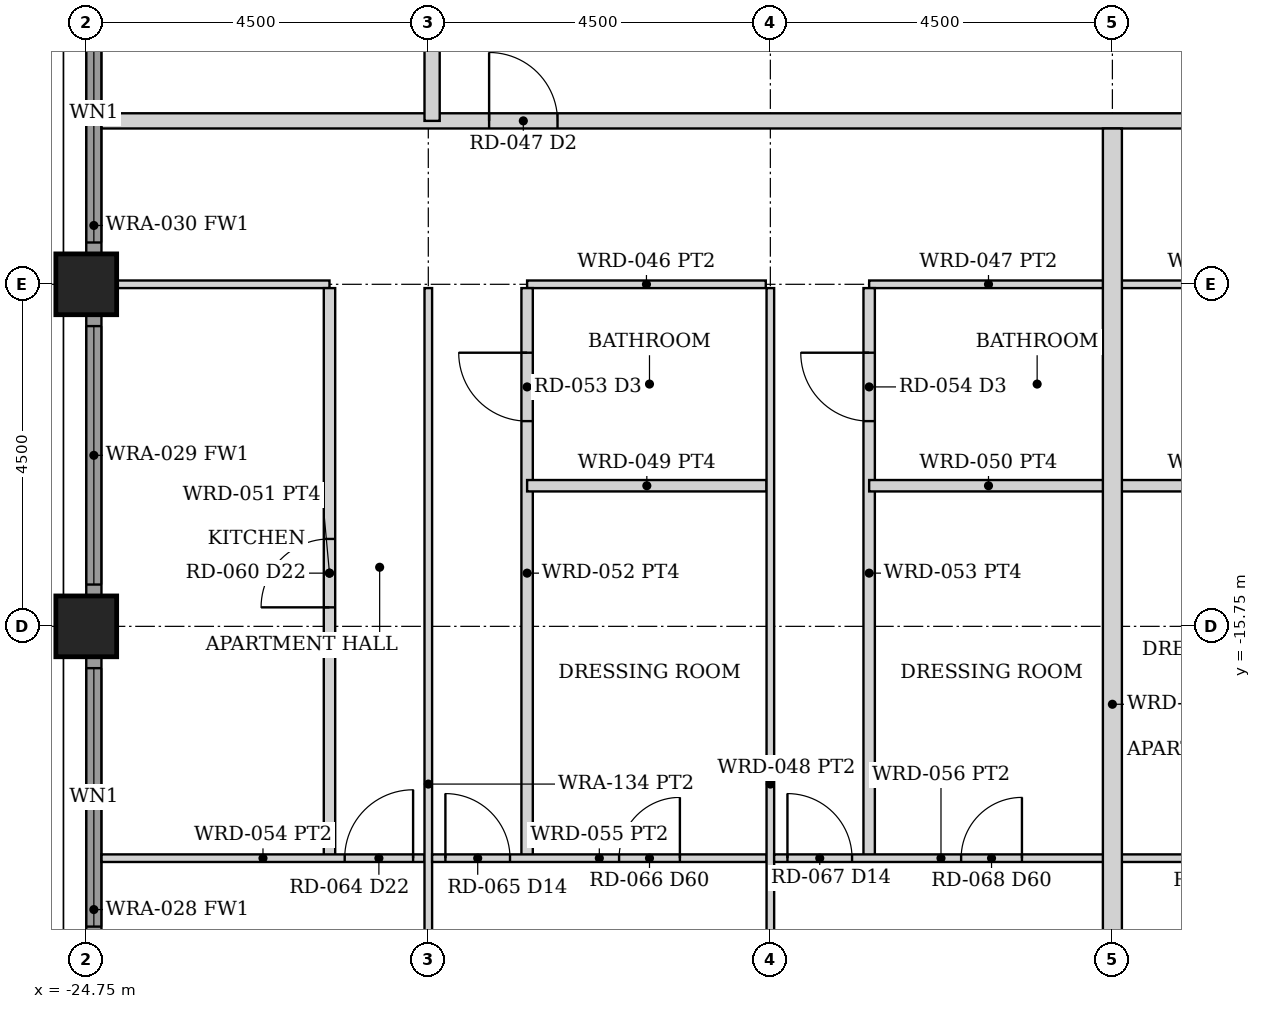
"""IFC4 building model, lengths in metres.
Left out: names, types, materials, properties, quantities, classifications, styles, units other than length and angle.
Written with IfcOpenShell. Run it as: python <this file> out.ifc"""

import sys

from ifc_helpers import new_model, si_unit, direction, frame, frame_2d, origin, origin_2d, place, context, subcontext, project, spatial, rectangle, hollow_rectangle, extrude, element, fill, save


model = new_model("IFC4")
c1 = context("Model", 3, precision=1e-05, world=origin(), true_north=direction((0.0, 1.0)))
c2 = subcontext(c1, "Body", "Model", "MODEL_VIEW")
j1 = project(units=[si_unit("LENGTHUNIT", "METRE"), si_unit("PLANEANGLEUNIT", "RADIAN")], contexts=[c1])
p1 = place(None, origin())
s1 = spatial("IfcSite", under=j1, at=p1, CompositionType="ELEMENT")
p2 = place(p1, origin())
s2 = spatial("IfcBuilding", under=s1, at=p2, CompositionType="ELEMENT")
p3 = place(p2, frame((0.0, 0.0, 58.0)))
s3 = spatial("IfcBuildingStorey", under=s2, at=p3, CompositionType="ELEMENT", Elevation=58.0)
for number, where, z_axis, x_axis in (
    (1, (-24.75, -15.75, 0.0), (0.0, 0.0, 1.0), (1.0, 0.0, 0.0)),
    (2, (-24.75, -11.25, 0.0), (0.0, 0.0, 1.0), (1.0, 0.0, 0.0)),
):
    element("IfcColumn", number, at=place(p3, frame(where, z_axis=z_axis, x_axis=x_axis)), inside=s3, PredefinedType="COLUMN", context=c2, shape_type="SweptSolid", body=[
        extrude(hollow_rectangle(XDim=0.8, YDim=0.8, WallThickness=0.06, at=origin_2d()), origin(), (0.0, 0.0, 1.0), 3.5),
    ])
p4 = place(p3, frame((-24.65, -19.845, 0.0), z_axis=(0.0, 0.0, 1.0), x_axis=(0.0, 1.0, 0.0)))
e3 = element("IfcWall", 3, at=p4, inside=s3, PredefinedType="SOLIDWALL", context=c2, shape_type="SweptSolid", body=[
    extrude(rectangle(XDim=3.69, YDim=0.2, at=frame_2d((1.845, 0.0))), origin(), (0.0, 0.0, 1.0), 2.379),
])
p5 = place(p4, frame((0.145, 0.0, 0.3)))
e4 = element("IfcOpeningElement", 4, at=p5, cuts=e3, PredefinedType="OPENING", context=c2, shape_type="SweptSolid", body=[
    extrude(rectangle(XDim=3.4, YDim=1.929, at=frame_2d((1.7, 0.964))), frame((0.0, 0.11, 0.0), z_axis=(0.0, -1.0, 0.0), x_axis=(1.0, 0.0, 0.0)), (0.0, 0.0, 1.0), 0.22),
])
p6 = place(p3, frame((-24.65, -15.345, 0.0), z_axis=(0.0, 0.0, 1.0), x_axis=(0.0, 1.0, 0.0)))
e5 = element("IfcWall", 5, at=p6, inside=s3, PredefinedType="SOLIDWALL", context=c2, shape_type="SweptSolid", body=[
    extrude(rectangle(XDim=3.69, YDim=0.2, at=frame_2d((1.845, 0.0))), origin(), (0.0, 0.0, 1.0), 2.379),
])
p7 = place(p6, frame((0.145, 0.0, 0.3)))
e6 = element("IfcOpeningElement", 6, at=p7, cuts=e5, PredefinedType="OPENING", context=c2, shape_type="SweptSolid", body=[
    extrude(rectangle(XDim=3.4, YDim=1.929, at=frame_2d((1.7, 0.964))), frame((0.0, 0.11, 0.0), z_axis=(0.0, -1.0, 0.0), x_axis=(1.0, 0.0, 0.0)), (0.0, 0.0, 1.0), 0.22),
])
p8 = place(p3, frame((-24.65, -10.845, 0.0), z_axis=(0.0, 0.0, 1.0), x_axis=(0.0, 1.0, 0.0)))
e7 = element("IfcWall", 7, at=p8, inside=s3, PredefinedType="SOLIDWALL", context=c2, shape_type="SweptSolid", body=[
    extrude(rectangle(XDim=3.69, YDim=0.2, at=frame_2d((1.845, 0.0))), origin(), (0.0, 0.0, 1.0), 2.379),
])
p9 = place(p8, frame((0.145, 0.0, 0.3)))
e8 = element("IfcOpeningElement", 8, at=p9, cuts=e7, PredefinedType="OPENING", context=c2, shape_type="SweptSolid", body=[
    extrude(rectangle(XDim=3.4, YDim=1.929, at=frame_2d((1.7, 0.964))), frame((0.0, 0.11, 0.0), z_axis=(0.0, -1.0, 0.0), x_axis=(1.0, 0.0, 0.0)), (0.0, 0.0, 1.0), 0.22),
])
p10 = place(p3, frame((-24.55, -9.1, 0.0), z_axis=(0.0, 0.0, 1.0), x_axis=(1.0, 0.0, 0.0)))
e9 = element("IfcWall", 9, at=p10, inside=s3, PredefinedType="PARTITIONING", context=c2, shape_type="SweptSolid", body=[
    extrude(rectangle(XDim=49.1, YDim=0.2, at=frame_2d((24.55, 0.0))), origin(), (0.0, 0.0, 1.0), 2.373),
])
p11 = place(p10, frame((5.1, 0.0, 0.0)))
e10 = element("IfcOpeningElement", 10, at=p11, cuts=e9, PredefinedType="OPENING", context=c2, shape_type="SweptSolid", body=[
    extrude(rectangle(XDim=0.9, YDim=2.1, at=frame_2d((0.45, 1.05))), frame((0.0, 0.11, 0.0), z_axis=(0.0, -1.0, 0.0), x_axis=(1.0, 0.0, 0.0)), (0.0, 0.0, 1.0), 0.22),
])
p12 = place(p10, frame((18.1, 0.0, 0.0)))
e11 = element("IfcOpeningElement", 11, at=p12, cuts=e9, PredefinedType="OPENING", context=c2, shape_type="SweptSolid", body=[
    extrude(rectangle(XDim=0.9, YDim=2.1, at=frame_2d((0.45, 1.05))), frame((0.0, 0.11, 0.0), z_axis=(0.0, -1.0, 0.0), x_axis=(1.0, 0.0, 0.0)), (0.0, 0.0, 1.0), 0.22),
])
p13 = place(p10, frame((22.5, 0.0, 0.0)))
e12 = element("IfcOpeningElement", 12, at=p13, cuts=e9, PredefinedType="OPENING", context=c2, shape_type="SweptSolid", body=[
    extrude(rectangle(XDim=0.9, YDim=2.1, at=frame_2d((0.45, 1.05))), frame((0.0, 0.11, 0.0), z_axis=(0.0, -1.0, 0.0), x_axis=(1.0, 0.0, 0.0)), (0.0, 0.0, 1.0), 0.22),
])
p14 = place(p10, frame((27.1, 0.0, 0.0)))
e13 = element("IfcOpeningElement", 13, at=p14, cuts=e9, PredefinedType="OPENING", context=c2, shape_type="SweptSolid", body=[
    extrude(rectangle(XDim=0.9, YDim=2.1, at=frame_2d((0.45, 1.05))), frame((0.0, 0.11, 0.0), z_axis=(0.0, -1.0, 0.0), x_axis=(1.0, 0.0, 0.0)), (0.0, 0.0, 1.0), 0.22),
])
p15 = place(p10, frame((43.1, 0.0, 0.0)))
e14 = element("IfcOpeningElement", 14, at=p15, cuts=e9, PredefinedType="OPENING", context=c2, shape_type="SweptSolid", body=[
    extrude(rectangle(XDim=0.9, YDim=2.1, at=frame_2d((0.45, 1.05))), frame((0.0, 0.11, 0.0), z_axis=(0.0, -1.0, 0.0), x_axis=(1.0, 0.0, 0.0)), (0.0, 0.0, 1.0), 0.22),
])
p16 = place(p3, frame((-20.2, -9.1, 0.0), z_axis=(0.0, 0.0, 1.0), x_axis=(0.0, 1.0, 0.0)))
e15 = element("IfcWall", 15, at=p16, inside=s3, PredefinedType="PARTITIONING", context=c2, shape_type="SweptSolid", body=[
    extrude(rectangle(XDim=18.2, YDim=0.2, at=frame_2d((9.1, 0.0))), origin(), (0.0, 0.0, 1.0), 2.373),
])
p17 = place(p16, frame((8.6, 0.0, 0.0)))
e16 = element("IfcOpeningElement", 16, at=p17, cuts=e15, PredefinedType="OPENING", context=c2, shape_type="SweptSolid", body=[
    extrude(rectangle(XDim=1.0, YDim=2.1, at=frame_2d((0.5, 1.05))), frame((0.0, 0.11, 0.0), z_axis=(0.0, -1.0, 0.0), x_axis=(1.0, 0.0, 0.0)), (0.0, 0.0, 1.0), 0.22),
])
p18 = place(p3, frame((-24.35, -11.25, 0.0), z_axis=(0.0, 0.0, 1.0), x_axis=(1.0, 0.0, 0.0)))
e17 = element("IfcWall", 17, at=p18, inside=s3, PredefinedType="PARTITIONING", context=c2, shape_type="SweptSolid", body=[
    extrude(rectangle(XDim=2.8, YDim=0.1, at=frame_2d((1.4, 0.0))), origin(), (0.0, 0.0, 1.0), 2.373),
])
p19 = place(p3, frame((-21.55, -18.8, 0.0), z_axis=(0.0, 0.0, 1.0), x_axis=(0.0, 1.0, 0.0)))
e18 = element("IfcWall", 18, at=p19, inside=s3, PredefinedType="PARTITIONING", context=c2, shape_type="SweptSolid", body=[
    extrude(rectangle(XDim=7.5, YDim=0.15, at=frame_2d((3.75, 0.0))), origin(), (0.0, 0.0, 1.0), 2.373),
])
p20 = place(p19, frame((3.3, 0.0, 0.0)))
e19 = element("IfcOpeningElement", 19, at=p20, cuts=e18, PredefinedType="OPENING", context=c2, shape_type="SweptSolid", body=[
    extrude(rectangle(XDim=0.9, YDim=2.1, at=frame_2d((0.45, 1.05))), frame((0.0, 0.085, 0.0), z_axis=(0.0, -1.0, 0.0), x_axis=(1.0, 0.0, 0.0)), (0.0, 0.0, 1.0), 0.17),
])
p21 = place(p3, frame((-24.55, -18.8, 0.0), z_axis=(0.0, 0.0, 1.0), x_axis=(1.0, 0.0, 0.0)))
e20 = element("IfcWall", 20, at=p21, inside=s3, PredefinedType="PARTITIONING", context=c2, shape_type="SweptSolid", body=[
    extrude(rectangle(XDim=4.25, YDim=0.1, at=frame_2d((2.125, 0.0))), origin(), (0.0, 0.0, 1.0), 2.373),
])
p22 = place(p21, frame((3.2, 0.0, 0.0)))
e21 = element("IfcOpeningElement", 21, at=p22, cuts=e20, PredefinedType="OPENING", context=c2, shape_type="SweptSolid", body=[
    extrude(rectangle(XDim=0.9, YDim=2.1, at=frame_2d((0.45, 1.05))), frame((0.0, 0.06, 0.0), z_axis=(0.0, -1.0, 0.0), x_axis=(1.0, 0.0, 0.0)), (0.0, 0.0, 1.0), 0.12),
])
p23 = place(p3, frame((-20.25, -24.35, 0.0), z_axis=(0.0, 0.0, 1.0), x_axis=(0.0, 1.0, 0.0)))
e22 = element("IfcWall", 22, at=p23, inside=s3, PredefinedType="PARTITIONING", context=c2, shape_type="SweptSolid", body=[
    extrude(rectangle(XDim=13.05, YDim=0.1, at=frame_2d((6.525, 0.0))), origin(), (0.0, 0.0, 1.0), 2.373),
])
p24 = place(p3, frame((-18.95, -11.25, 0.0), z_axis=(0.0, 0.0, 1.0), x_axis=(1.0, 0.0, 0.0)))
e23 = element("IfcWall", 23, at=p24, inside=s3, PredefinedType="PARTITIONING", context=c2, shape_type="SweptSolid", body=[
    extrude(rectangle(XDim=3.14, YDim=0.1, at=frame_2d((1.57, 0.0))), origin(), (0.0, 0.0, 1.0), 2.373),
])
p25 = place(p3, frame((-18.95, -18.8, 0.0), z_axis=(0.0, 0.0, 1.0), x_axis=(0.0, 1.0, 0.0)))
e24 = element("IfcWall", 24, at=p25, inside=s3, PredefinedType="PARTITIONING", context=c2, shape_type="SweptSolid", body=[
    extrude(rectangle(XDim=7.5, YDim=0.15, at=frame_2d((3.75, 0.0))), origin(), (0.0, 0.0, 1.0), 2.373),
])
p26 = place(p25, frame((5.75, 0.0, 0.0)))
e25 = element("IfcOpeningElement", 25, at=p26, cuts=e24, PredefinedType="OPENING", context=c2, shape_type="SweptSolid", body=[
    extrude(rectangle(XDim=0.9, YDim=2.1, at=frame_2d((0.45, 1.05))), frame((0.0, 0.085, 0.0), z_axis=(0.0, -1.0, 0.0), x_axis=(1.0, 0.0, 0.0)), (0.0, 0.0, 1.0), 0.17),
])
p27 = place(p3, frame((-20.2, -18.8, 0.0), z_axis=(0.0, 0.0, 1.0), x_axis=(1.0, 0.0, 0.0)))
e26 = element("IfcWall", 26, at=p27, inside=s3, PredefinedType="PARTITIONING", context=c2, shape_type="SweptSolid", body=[
    extrude(rectangle(XDim=4.4, YDim=0.1, at=frame_2d((2.2, 0.0))), origin(), (0.0, 0.0, 1.0), 2.373),
])
p28 = place(p27, frame((0.175, 0.0, 0.0)))
e27 = element("IfcOpeningElement", 27, at=p28, cuts=e26, PredefinedType="OPENING", context=c2, shape_type="SweptSolid", body=[
    extrude(rectangle(XDim=0.85, YDim=2.1, at=frame_2d((0.425, 1.05))), frame((0.0, 0.06, 0.0), z_axis=(0.0, -1.0, 0.0), x_axis=(1.0, 0.0, 0.0)), (0.0, 0.0, 1.0), 0.12),
])
p29 = place(p27, frame((2.46, 0.0, 0.0)))
e28 = element("IfcOpeningElement", 28, at=p29, cuts=e26, PredefinedType="OPENING", context=c2, shape_type="SweptSolid", body=[
    extrude(rectangle(XDim=0.8, YDim=2.1, at=frame_2d((0.4, 1.05))), frame((0.0, 0.06, 0.0), z_axis=(0.0, -1.0, 0.0), x_axis=(1.0, 0.0, 0.0)), (0.0, 0.0, 1.0), 0.12),
])
p30 = place(p3, frame((-18.95, -13.9, 0.0), z_axis=(0.0, 0.0, 1.0), x_axis=(1.0, 0.0, 0.0)))
e29 = element("IfcWall", 29, at=p30, inside=s3, PredefinedType="PARTITIONING", context=c2, shape_type="SweptSolid", body=[
    extrude(rectangle(XDim=3.15, YDim=0.15, at=frame_2d((1.575, 0.0))), origin(), (0.0, 0.0, 1.0), 2.373),
])
p31 = place(p3, frame((-15.75, -24.35, 0.0), z_axis=(0.0, 0.0, 1.0), x_axis=(0.0, 1.0, 0.0)))
e30 = element("IfcWall", 30, at=p31, inside=s3, PredefinedType="PARTITIONING", context=c2, shape_type="SweptSolid", body=[
    extrude(rectangle(XDim=13.05, YDim=0.1, at=frame_2d((6.525, 0.0))), origin(), (0.0, 0.0, 1.0), 2.373),
])
p32 = place(p3, frame((-14.45, -11.25, 0.0), z_axis=(0.0, 0.0, 1.0), x_axis=(1.0, 0.0, 0.0)))
e31 = element("IfcWall", 31, at=p32, inside=s3, PredefinedType="PARTITIONING", context=c2, shape_type="SweptSolid", body=[
    extrude(rectangle(XDim=3.14, YDim=0.1, at=frame_2d((1.57, 0.0))), origin(), (0.0, 0.0, 1.0), 2.373),
])
p33 = place(p3, frame((-14.45, -18.8, 0.0), z_axis=(0.0, 0.0, 1.0), x_axis=(0.0, 1.0, 0.0)))
e32 = element("IfcWall", 32, at=p33, inside=s3, PredefinedType="PARTITIONING", context=c2, shape_type="SweptSolid", body=[
    extrude(rectangle(XDim=7.5, YDim=0.15, at=frame_2d((3.75, 0.0))), origin(), (0.0, 0.0, 1.0), 2.373),
])
p34 = place(p33, frame((5.75, 0.0, 0.0)))
e33 = element("IfcOpeningElement", 33, at=p34, cuts=e32, PredefinedType="OPENING", context=c2, shape_type="SweptSolid", body=[
    extrude(rectangle(XDim=0.9, YDim=2.1, at=frame_2d((0.45, 1.05))), frame((0.0, 0.085, 0.0), z_axis=(0.0, -1.0, 0.0), x_axis=(1.0, 0.0, 0.0)), (0.0, 0.0, 1.0), 0.17),
])
p35 = place(p3, frame((-15.7, -18.8, 0.0), z_axis=(0.0, 0.0, 1.0), x_axis=(1.0, 0.0, 0.0)))
e34 = element("IfcWall", 34, at=p35, inside=s3, PredefinedType="PARTITIONING", context=c2, shape_type="SweptSolid", body=[
    extrude(rectangle(XDim=4.39, YDim=0.1, at=frame_2d((2.195, 0.0))), origin(), (0.0, 0.0, 1.0), 2.373),
])
p36 = place(p35, frame((0.175, 0.0, 0.0)))
e35 = element("IfcOpeningElement", 35, at=p36, cuts=e34, PredefinedType="OPENING", context=c2, shape_type="SweptSolid", body=[
    extrude(rectangle(XDim=0.85, YDim=2.1, at=frame_2d((0.425, 1.05))), frame((0.0, 0.06, 0.0), z_axis=(0.0, -1.0, 0.0), x_axis=(1.0, 0.0, 0.0)), (0.0, 0.0, 1.0), 0.12),
])
p37 = place(p35, frame((2.46, 0.0, 0.0)))
e36 = element("IfcOpeningElement", 36, at=p37, cuts=e34, PredefinedType="OPENING", context=c2, shape_type="SweptSolid", body=[
    extrude(rectangle(XDim=0.8, YDim=2.1, at=frame_2d((0.4, 1.05))), frame((0.0, 0.06, 0.0), z_axis=(0.0, -1.0, 0.0), x_axis=(1.0, 0.0, 0.0)), (0.0, 0.0, 1.0), 0.12),
])
p38 = place(p3, frame((-14.45, -13.9, 0.0), z_axis=(0.0, 0.0, 1.0), x_axis=(1.0, 0.0, 0.0)))
e37 = element("IfcWall", 37, at=p38, inside=s3, PredefinedType="PARTITIONING", context=c2, shape_type="SweptSolid", body=[
    extrude(rectangle(XDim=3.14, YDim=0.15, at=frame_2d((1.57, 0.0))), origin(), (0.0, 0.0, 1.0), 2.373),
])
p39 = place(p3, frame((-11.19, -11.25, 0.0), z_axis=(0.0, 0.0, 1.0), x_axis=(1.0, 0.0, 0.0)))
e38 = element("IfcWall", 38, at=p39, inside=s3, PredefinedType="PARTITIONING", context=c2, shape_type="SweptSolid", body=[
    extrude(rectangle(XDim=3.14, YDim=0.1, at=frame_2d((1.57, 0.0))), origin(), (0.0, 0.0, 1.0), 2.373),
])
p40 = place(p3, frame((-11.19, -18.8, 0.0), z_axis=(0.0, 0.0, 1.0), x_axis=(1.0, 0.0, 0.0)))
e39 = element("IfcWall", 39, at=p40, inside=s3, PredefinedType="PARTITIONING", context=c2, shape_type="SweptSolid", body=[
    extrude(rectangle(XDim=4.39, YDim=0.1, at=frame_2d((2.195, 0.0))), origin(), (0.0, 0.0, 1.0), 2.373),
])
p41 = place(p40, frame((3.365, 0.0, 0.0)))
e40 = element("IfcOpeningElement", 40, at=p41, cuts=e39, PredefinedType="OPENING", context=c2, shape_type="SweptSolid", body=[
    extrude(rectangle(XDim=0.85, YDim=2.1, at=frame_2d((0.425, 1.05))), frame((0.0, 0.06, 0.0), z_axis=(0.0, -1.0, 0.0), x_axis=(1.0, 0.0, 0.0)), (0.0, 0.0, 1.0), 0.12),
])
p42 = place(p40, frame((1.13, 0.0, 0.0)))
e41 = element("IfcOpeningElement", 41, at=p42, cuts=e39, PredefinedType="OPENING", context=c2, shape_type="SweptSolid", body=[
    extrude(rectangle(XDim=0.8, YDim=2.1, at=frame_2d((0.4, 1.05))), frame((0.0, 0.06, 0.0), z_axis=(0.0, -1.0, 0.0), x_axis=(1.0, 0.0, 0.0)), (0.0, 0.0, 1.0), 0.12),
])
p43 = place(p3, frame((-11.19, -13.9, 0.0), z_axis=(0.0, 0.0, 1.0), x_axis=(1.0, 0.0, 0.0)))
e42 = element("IfcWall", 42, at=p43, inside=s3, PredefinedType="PARTITIONING", context=c2, shape_type="SweptSolid", body=[
    extrude(rectangle(XDim=3.14, YDim=0.15, at=frame_2d((1.57, 0.0))), origin(), (0.0, 0.0, 1.0), 2.373),
])
p44 = place(p3, frame((-11.25, -24.35, 0.0), z_axis=(0.0, 0.0, 1.0), x_axis=(0.0, 1.0, 0.0)))
e43 = element("IfcWall", 43, at=p44, inside=s3, PredefinedType="PARTITIONING", context=c2, shape_type="SweptSolid", body=[
    extrude(rectangle(XDim=15.15, YDim=0.25, at=frame_2d((7.575, 0.0))), origin(), (0.0, 0.0, 1.0), 2.373),
])
p45 = place(p5, origin())
e44 = element("IfcWindow", 44, at=p45, inside=s3, PartitioningType="SINGLE_PANEL", PredefinedType="WINDOW", context=c2, shape_type="SweptSolid", body=[
    extrude(rectangle(XDim=3.4, YDim=1.929, at=frame_2d((1.7, 0.964))), frame((0.0, 0.03, 0.0), z_axis=(0.0, -1.0, 0.0), x_axis=(1.0, 0.0, 0.0)), (0.0, 0.0, 1.0), 0.06),
])
fill(e4, e44)
p46 = place(p7, origin())
e45 = element("IfcWindow", 45, at=p46, inside=s3, PartitioningType="SINGLE_PANEL", PredefinedType="WINDOW", context=c2, shape_type="SweptSolid", body=[
    extrude(rectangle(XDim=3.4, YDim=1.929, at=frame_2d((1.7, 0.964))), frame((0.0, 0.03, 0.0), z_axis=(0.0, -1.0, 0.0), x_axis=(1.0, 0.0, 0.0)), (0.0, 0.0, 1.0), 0.06),
])
fill(e6, e45)
p47 = place(p9, origin())
e46 = element("IfcWindow", 46, at=p47, inside=s3, PartitioningType="SINGLE_PANEL", PredefinedType="WINDOW", context=c2, shape_type="SweptSolid", body=[
    extrude(rectangle(XDim=3.4, YDim=1.929, at=frame_2d((1.7, 0.964))), frame((0.0, 0.03, 0.0), z_axis=(0.0, -1.0, 0.0), x_axis=(1.0, 0.0, 0.0)), (0.0, 0.0, 1.0), 0.06),
])
fill(e8, e46)
p48 = place(p11, origin())
e47 = element("IfcDoor", 47, at=p48, inside=s3, OperationType="SINGLE_SWING_LEFT", PredefinedType="DOOR", context=c2, shape_type="SweptSolid", body=[
    extrude(rectangle(XDim=0.9, YDim=2.1, at=frame_2d((0.45, 1.05))), frame((0.0, 0.025, 0.0), z_axis=(0.0, -1.0, 0.0), x_axis=(1.0, 0.0, 0.0)), (0.0, 0.0, 1.0), 0.05),
])
fill(e10, e47)
p49 = place(p20, origin())
e48 = element("IfcDoor", 48, at=p49, inside=s3, OperationType="SINGLE_SWING_LEFT", PredefinedType="DOOR", context=c2, shape_type="SweptSolid", body=[
    extrude(rectangle(XDim=0.9, YDim=2.1, at=frame_2d((0.45, 1.05))), frame((0.0, 0.025, 0.0), z_axis=(0.0, -1.0, 0.0), x_axis=(1.0, 0.0, 0.0)), (0.0, 0.0, 1.0), 0.05),
])
fill(e19, e48)
p50 = place(p22, origin())
e49 = element("IfcDoor", 49, at=p50, inside=s3, OperationType="SINGLE_SWING_RIGHT", PredefinedType="DOOR", context=c2, shape_type="SweptSolid", body=[
    extrude(rectangle(XDim=0.9, YDim=2.1, at=frame_2d((0.45, 1.05))), frame((0.0, 0.025, 0.0), z_axis=(0.0, -1.0, 0.0), x_axis=(1.0, 0.0, 0.0)), (0.0, 0.0, 1.0), 0.05),
])
fill(e21, e49)
p51 = place(p28, origin())
e50 = element("IfcDoor", 50, at=p51, inside=s3, OperationType="SINGLE_SWING_LEFT", PredefinedType="DOOR", context=c2, shape_type="SweptSolid", body=[
    extrude(rectangle(XDim=0.85, YDim=2.1, at=frame_2d((0.425, 1.05))), frame((0.0, 0.025, 0.0), z_axis=(0.0, -1.0, 0.0), x_axis=(1.0, 0.0, 0.0)), (0.0, 0.0, 1.0), 0.05),
])
fill(e27, e50)
p52 = place(p26, origin())
e51 = element("IfcDoor", 51, at=p52, inside=s3, OperationType="SINGLE_SWING_RIGHT", PredefinedType="DOOR", context=c2, shape_type="SweptSolid", body=[
    extrude(rectangle(XDim=0.9, YDim=2.1, at=frame_2d((0.45, 1.05))), frame((0.0, 0.025, 0.0), z_axis=(0.0, -1.0, 0.0), x_axis=(1.0, 0.0, 0.0)), (0.0, 0.0, 1.0), 0.05),
])
fill(e25, e51)
p53 = place(p29, origin())
e52 = element("IfcDoor", 52, at=p53, inside=s3, OperationType="SINGLE_SWING_RIGHT", PredefinedType="DOOR", context=c2, shape_type="SweptSolid", body=[
    extrude(rectangle(XDim=0.8, YDim=2.1, at=frame_2d((0.4, 1.05))), frame((0.0, 0.025, 0.0), z_axis=(0.0, -1.0, 0.0), x_axis=(1.0, 0.0, 0.0)), (0.0, 0.0, 1.0), 0.05),
])
fill(e28, e52)
p54 = place(p36, origin())
e53 = element("IfcDoor", 53, at=p54, inside=s3, OperationType="SINGLE_SWING_LEFT", PredefinedType="DOOR", context=c2, shape_type="SweptSolid", body=[
    extrude(rectangle(XDim=0.85, YDim=2.1, at=frame_2d((0.425, 1.05))), frame((0.0, 0.025, 0.0), z_axis=(0.0, -1.0, 0.0), x_axis=(1.0, 0.0, 0.0)), (0.0, 0.0, 1.0), 0.05),
])
fill(e35, e53)
p55 = place(p34, origin())
e54 = element("IfcDoor", 54, at=p55, inside=s3, OperationType="SINGLE_SWING_RIGHT", PredefinedType="DOOR", context=c2, shape_type="SweptSolid", body=[
    extrude(rectangle(XDim=0.9, YDim=2.1, at=frame_2d((0.45, 1.05))), frame((0.0, 0.025, 0.0), z_axis=(0.0, -1.0, 0.0), x_axis=(1.0, 0.0, 0.0)), (0.0, 0.0, 1.0), 0.05),
])
fill(e33, e54)
p56 = place(p37, origin())
e55 = element("IfcDoor", 55, at=p56, inside=s3, OperationType="SINGLE_SWING_RIGHT", PredefinedType="DOOR", context=c2, shape_type="SweptSolid", body=[
    extrude(rectangle(XDim=0.8, YDim=2.1, at=frame_2d((0.4, 1.05))), frame((0.0, 0.025, 0.0), z_axis=(0.0, -1.0, 0.0), x_axis=(1.0, 0.0, 0.0)), (0.0, 0.0, 1.0), 0.05),
])
fill(e36, e55)
save(model, sys.argv[1])
